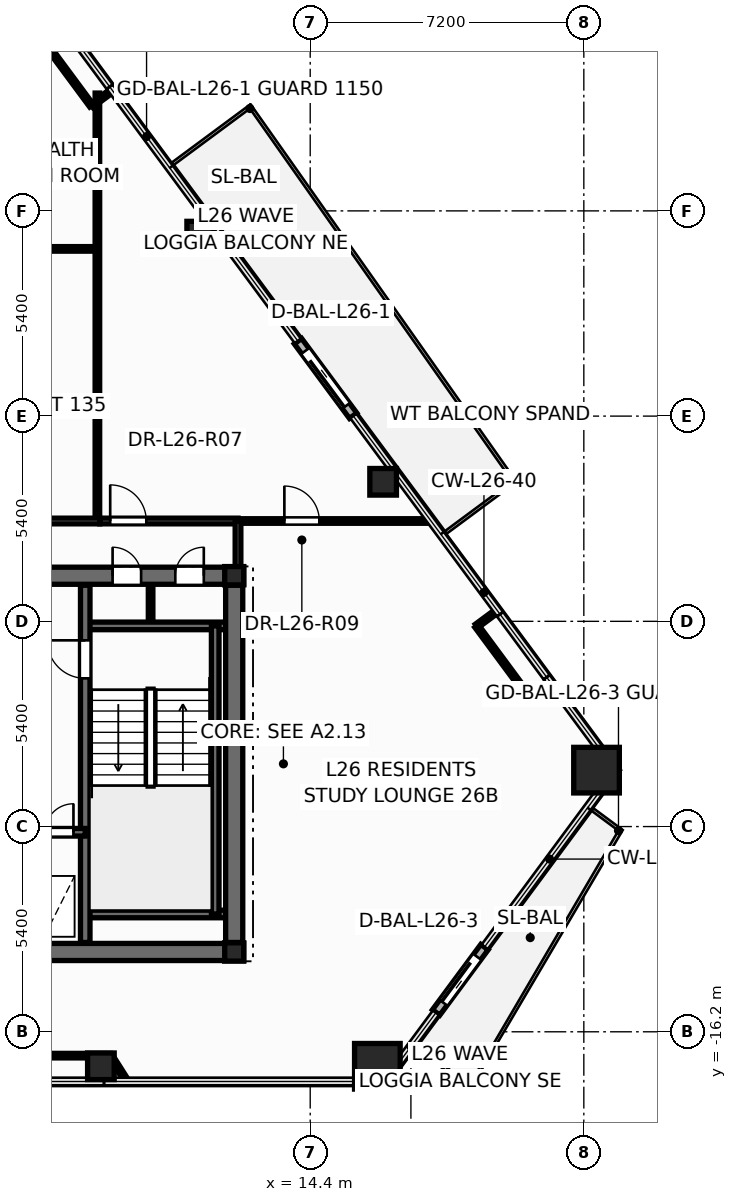
"""IFC4 building model, lengths in metres.
Left out: names, types, materials, properties, quantities, classifications, styles, units other than length and angle.
Written with IfcOpenShell. Run it as: python <this file> out.ifc"""

import sys

from ifc_helpers import new_model, si_unit, direction, frame, frame_2d, origin, origin_2d, place, context, subcontext, project, spatial, rectangle, hollow_rectangle, hollow_circle, i_section, extrude, element, fill, save


model = new_model("IFC4")
c1 = context("Model", 3, precision=1e-05, world=origin(), true_north=direction((0.0, 1.0)))
c2 = subcontext(c1, "Body", "Model", "MODEL_VIEW")
j1 = project(units=[si_unit("LENGTHUNIT", "METRE"), si_unit("PLANEANGLEUNIT", "RADIAN")], contexts=[c1])
p1 = place(None, origin())
s1 = spatial("IfcSite", under=j1, at=p1, CompositionType="ELEMENT")
p2 = place(p1, origin())
s2 = spatial("IfcBuilding", under=s1, at=p2, CompositionType="ELEMENT")
p3 = place(p2, frame((0.0, 0.0, 103.2)))
s3 = spatial("IfcBuildingStorey", under=s2, at=p3, CompositionType="ELEMENT", Elevation=103.2)
for number, where, z_axis, x_axis in (
    (1, (16.167, -17.108, 0.0), (0.0, 0.0, 1.0), (1.0, 0.0, 0.0)),
    (2, (21.934, -9.316, 0.0), (0.0, 0.0, 1.0), (1.0, 0.0, 0.0)),
):
    element("IfcColumn", number, at=place(p3, frame(where, z_axis=z_axis, x_axis=x_axis)), inside=s3, PredefinedType="COLUMN", context=c2, shape_type="SweptSolid", body=[
        extrude(hollow_rectangle(XDim=1.2, YDim=1.2, WallThickness=0.055, at=origin_2d()), origin(), (0.0, 0.0, 1.0), 3.6),
    ])
for number, where, z_axis, x_axis in (
    (3, (8.892, -17.108, 0.0), (0.0, 0.0, 1.0), (1.0, 0.0, 0.0)),
    (4, (16.319, -1.729, 0.0), (0.0, 0.0, 1.0), (1.0, 0.0, 0.0)),
    (5, (11.506, 4.775, 0.0), (0.0, 0.0, 1.0), (1.0, 0.0, 0.0)),
):
    element("IfcColumn", number, at=place(p3, frame(where, z_axis=z_axis, x_axis=x_axis)), inside=s3, PredefinedType="COLUMN", context=c2, shape_type="SweptSolid", body=[
        extrude(hollow_circle(Radius=0.35, WallThickness=0.03, at=origin_2d()), origin(), (0.0, 0.0, 1.0), 3.6),
    ])
for number, where, z_axis, x_axis in (
    (6, (12.4, -14.1, 0.0), (0.0, 0.0, 1.0), (1.0, 0.0, 0.0)),
    (7, (12.4, -4.2, 0.0), (0.0, 0.0, 1.0), (1.0, 0.0, 0.0)),
):
    element("IfcColumn", number, at=place(p3, frame(where, z_axis=z_axis, x_axis=x_axis)), inside=s3, PredefinedType="COLUMN", context=c2, shape_type="SweptSolid", body=[
        extrude(i_section(OverallWidth=0.5, OverallDepth=0.482, WebThickness=0.04, FlangeThickness=0.045, at=origin_2d()), origin(), (0.0, 0.0, 1.0), 3.6),
    ])
p4 = place(p3, frame((15.53, 0.01, -0.015), z_axis=(0.0, 0.0, 1.0), x_axis=(-0.594897308784, 0.803801711868, 0.0)))
e8 = element("IfcWall", 8, at=p4, inside=s3, PredefinedType="STANDARD", context=c2, shape_type="SweptSolid", body=[
    extrude(rectangle(XDim=2.44, YDim=0.24, at=frame_2d((1.22, 0.0))), origin(), (0.0, 0.0, 1.0), 2.728),
])
p5 = place(p4, frame((0.32, 0.0, 0.015)))
e9 = element("IfcOpeningElement", 9, at=p5, cuts=e8, PredefinedType="OPENING", context=c2, shape_type="SweptSolid", body=[
    extrude(rectangle(XDim=1.806, YDim=2.204, at=frame_2d((0.9, 1.102))), frame((0.0, 0.13, 0.0), z_axis=(0.0, -1.0, 0.0), x_axis=(1.0, 0.0, 0.0)), (0.0, 0.0, 1.0), 0.26),
])
p6 = place(p3, frame((17.713, -15.691, -0.015), z_axis=(0.0, 0.0, 1.0), x_axis=(0.59491376708, 0.803789530747, 0.0)))
e10 = element("IfcWall", 10, at=p6, inside=s3, PredefinedType="STANDARD", context=c2, shape_type="SweptSolid", body=[
    extrude(rectangle(XDim=2.14, YDim=0.24, at=frame_2d((1.07, 0.0))), origin(), (0.0, 0.0, 1.0), 2.728),
])
p7 = place(p6, frame((0.32, 0.0, 0.015)))
e11 = element("IfcOpeningElement", 11, at=p7, cuts=e10, PredefinedType="OPENING", context=c2, shape_type="SweptSolid", body=[
    extrude(rectangle(XDim=1.506, YDim=2.204, at=frame_2d((0.75, 1.102))), frame((0.0, 0.13, 0.0), z_axis=(0.0, -1.0, 0.0), x_axis=(1.0, 0.0, 0.0)), (0.0, 0.0, 1.0), 0.26),
])
p8 = place(p3, frame((10.2, -5.52, 0.0), z_axis=(0.0, 0.0, 1.0), x_axis=(0.0, 1.0, 0.0)))
e12 = element("IfcWall", 12, at=p8, inside=s3, PredefinedType="PARTITIONING", context=c2, shape_type="SweptSolid", body=[
    extrude(rectangle(XDim=1.12, YDim=0.12, at=frame_2d((0.56, 0.0))), origin(), (0.0, 0.0, 1.0), 3.35),
])
p9 = place(p3, frame((-12.65, -14.1, 0.0), z_axis=(0.0, 0.0, 1.0), x_axis=(1.0, 0.0, 0.0)))
e13 = element("IfcWall", 13, at=p9, inside=s3, PredefinedType="SHEAR", context=c2, shape_type="SweptSolid", body=[
    extrude(rectangle(XDim=25.3, YDim=0.45, at=frame_2d((12.65, 0.0))), origin(), (0.0, 0.0, 1.0), 3.6),
])
p10 = place(p3, frame((-12.65, -4.2, 0.0), z_axis=(0.0, 0.0, 1.0), x_axis=(1.0, 0.0, 0.0)))
e14 = element("IfcWall", 14, at=p10, inside=s3, PredefinedType="SHEAR", context=c2, shape_type="SweptSolid", body=[
    extrude(rectangle(XDim=25.3, YDim=0.45, at=frame_2d((12.65, 0.0))), origin(), (0.0, 0.0, 1.0), 3.6),
])
p11 = place(p10, frame((0.95, 0.0, 0.0)))
e15 = element("IfcOpeningElement", 15, at=p11, cuts=e14, PredefinedType="OPENING", context=c2, shape_type="SweptSolid", body=[
    extrude(rectangle(XDim=0.756, YDim=2.054, at=frame_2d((0.375, 1.027))), frame((0.0, 0.235, 0.0), z_axis=(0.0, -1.0, 0.0), x_axis=(1.0, 0.0, 0.0)), (0.0, 0.0, 1.0), 0.47),
])
p12 = place(p10, frame((2.6, 0.0, 0.0)))
e16 = element("IfcOpeningElement", 16, at=p12, cuts=e14, PredefinedType="OPENING", context=c2, shape_type="SweptSolid", body=[
    extrude(rectangle(XDim=0.756, YDim=2.054, at=frame_2d((0.375, 1.027))), frame((0.0, 0.235, 0.0), z_axis=(0.0, -1.0, 0.0), x_axis=(1.0, 0.0, 0.0)), (0.0, 0.0, 1.0), 0.47),
])
p13 = place(p10, frame((21.85, 0.0, 0.0)))
e17 = element("IfcOpeningElement", 17, at=p13, cuts=e14, PredefinedType="OPENING", context=c2, shape_type="SweptSolid", body=[
    extrude(rectangle(XDim=0.756, YDim=2.054, at=frame_2d((0.375, 1.027))), frame((0.0, 0.235, 0.0), z_axis=(0.0, -1.0, 0.0), x_axis=(1.0, 0.0, 0.0)), (0.0, 0.0, 1.0), 0.47),
])
p14 = place(p10, frame((23.5, 0.0, 0.0)))
e18 = element("IfcOpeningElement", 18, at=p14, cuts=e14, PredefinedType="OPENING", context=c2, shape_type="SweptSolid", body=[
    extrude(rectangle(XDim=0.756, YDim=2.054, at=frame_2d((0.375, 1.027))), frame((0.0, 0.235, 0.0), z_axis=(0.0, -1.0, 0.0), x_axis=(1.0, 0.0, 0.0)), (0.0, 0.0, 1.0), 0.47),
])
p15 = place(p10, frame((5.85, 0.0, 0.0)))
e19 = element("IfcOpeningElement", 19, at=p15, cuts=e14, PredefinedType="OPENING", context=c2, shape_type="SweptSolid", body=[
    extrude(rectangle(XDim=1.006, YDim=2.104, at=frame_2d((0.5, 1.052))), frame((0.0, 0.235, 0.0), z_axis=(0.0, -1.0, 0.0), x_axis=(1.0, 0.0, 0.0)), (0.0, 0.0, 1.0), 0.47),
])
p16 = place(p10, frame((10.35, 0.0, 0.0)))
e20 = element("IfcOpeningElement", 20, at=p16, cuts=e14, PredefinedType="OPENING", context=c2, shape_type="SweptSolid", body=[
    extrude(rectangle(XDim=1.406, YDim=2.154, at=frame_2d((0.7, 1.077))), frame((0.0, 0.235, 0.0), z_axis=(0.0, -1.0, 0.0), x_axis=(1.0, 0.0, 0.0)), (0.0, 0.0, 1.0), 0.47),
])
p17 = place(p10, frame((18.45, 0.0, 0.0)))
e21 = element("IfcOpeningElement", 21, at=p17, cuts=e14, PredefinedType="OPENING", context=c2, shape_type="SweptSolid", body=[
    extrude(rectangle(XDim=1.006, YDim=2.104, at=frame_2d((0.5, 1.052))), frame((0.0, 0.235, 0.0), z_axis=(0.0, -1.0, 0.0), x_axis=(1.0, 0.0, 0.0)), (0.0, 0.0, 1.0), 0.47),
])
for number, where, z_axis, x_axis in (
    (22, (8.48, -5.52, 0.0), (0.0, 0.0, 1.0), (1.0, 0.0, 0.0)),
    (23, (8.48, -13.1, 0.0), (0.0, 0.0, 1.0), (1.0, 0.0, 0.0)),
):
    element("IfcWall", number, at=place(p3, frame(where, z_axis=z_axis, x_axis=x_axis)), inside=s3, PredefinedType="SOLIDWALL", context=c2, shape_type="SweptSolid", body=[
        extrude(rectangle(XDim=3.87, YDim=0.2, at=frame_2d((1.935, 0.0))), origin(), (0.0, 0.0, 1.0), 3.6),
    ])
p18 = place(p3, frame((11.9, -13.1, 0.0), z_axis=(0.0, 0.0, 1.0), x_axis=(0.0, 1.0, 0.0)))
e24 = element("IfcWall", 24, at=p18, inside=s3, PredefinedType="SOLIDWALL", context=c2, shape_type="SweptSolid", body=[
    extrude(rectangle(XDim=7.58, YDim=0.2, at=frame_2d((3.79, 0.0))), origin(), (0.0, 0.0, 1.0), 3.6),
])
p19 = place(p3, frame((8.48, -13.85, 0.0), z_axis=(0.0, 0.0, 1.0), x_axis=(0.0, 1.0, 0.0)))
e25 = element("IfcWall", 25, at=p19, inside=s3, PredefinedType="SHEAR", context=c2, shape_type="SweptSolid", body=[
    extrude(rectangle(XDim=9.4, YDim=0.25, at=frame_2d((4.7, 0.0))), origin(), (0.0, 0.0, 1.0), 3.6),
])
p20 = place(p19, frame((6.95, 0.0, 0.0)))
e26 = element("IfcOpeningElement", 26, at=p20, cuts=e25, PredefinedType="OPENING", context=c2, shape_type="SweptSolid", body=[
    extrude(rectangle(XDim=1.006, YDim=2.104, at=frame_2d((0.5, 1.052))), frame((0.0, 0.135, 0.0), z_axis=(0.0, -1.0, 0.0), x_axis=(1.0, 0.0, 0.0)), (0.0, 0.0, 1.0), 0.27),
])
p21 = place(p3, frame((5.12, -10.95, 0.0), z_axis=(0.0, 0.0, 1.0), x_axis=(1.0, 0.0, 0.0)))
e27 = element("IfcWall", 27, at=p21, inside=s3, PredefinedType="SOLIDWALL", context=c2, shape_type="SweptSolid", body=[
    extrude(rectangle(XDim=3.36, YDim=0.2, at=frame_2d((1.68, 0.0))), origin(), (0.0, 0.0, 1.0), 3.6),
])
p22 = place(p21, frame((0.42, 0.0, 0.0)))
e28 = element("IfcOpeningElement", 28, at=p22, cuts=e27, PredefinedType="OPENING", context=c2, shape_type="SweptSolid", body=[
    extrude(rectangle(XDim=1.106, YDim=2.104, at=frame_2d((0.55, 1.052))), frame((0.0, 0.11, 0.0), z_axis=(0.0, -1.0, 0.0), x_axis=(1.0, 0.0, 0.0)), (0.0, 0.0, 1.0), 0.22),
])
p23 = place(p21, frame((2.3, 0.0, 0.0)))
e29 = element("IfcOpeningElement", 29, at=p23, cuts=e27, PredefinedType="OPENING", context=c2, shape_type="SweptSolid", body=[
    extrude(rectangle(XDim=0.756, YDim=2.054, at=frame_2d((0.375, 1.027))), frame((0.0, 0.11, 0.0), z_axis=(0.0, -1.0, 0.0), x_axis=(1.0, 0.0, 0.0)), (0.0, 0.0, 1.0), 0.22),
])
p24 = place(p3, frame((12.4, -13.85, 0.0), z_axis=(0.0, 0.0, 1.0), x_axis=(0.0, 1.0, 0.0)))
e30 = element("IfcWall", 30, at=p24, inside=s3, PredefinedType="SHEAR", context=c2, shape_type="SweptSolid", body=[
    extrude(rectangle(XDim=9.4, YDim=0.45, at=frame_2d((4.7, 0.0))), origin(), (0.0, 0.0, 1.0), 3.6),
])
p25 = place(p3, frame((8.8, -2.76, 0.0), z_axis=(0.0, 0.0, 1.0), x_axis=(0.0, 1.0, 0.0)))
e31 = element("IfcWall", 31, at=p25, inside=s3, PredefinedType="PARTITIONING", context=c2, shape_type="SweptSolid", body=[
    extrude(rectangle(XDim=11.26, YDim=0.12, at=frame_2d((5.63, 0.0))), origin(), (0.0, 0.0, 1.0), 2.617),
])
p26 = place(p3, frame((2.36, 4.4, 0.0), z_axis=(0.0, 0.0, 1.0), x_axis=(1.0, 0.0, 0.0)))
e32 = element("IfcWall", 32, at=p26, inside=s3, PredefinedType="PARTITIONING", context=c2, shape_type="SweptSolid", body=[
    extrude(rectangle(XDim=6.44, YDim=0.12, at=frame_2d((3.22, 0.0))), origin(), (0.0, 0.0, 1.0), 2.617),
])
p27 = place(p3, frame((12.44, -2.76, 0.0), z_axis=(0.0, 0.0, 1.0), x_axis=(1.0, 0.0, 0.0)))
e33 = element("IfcWall", 33, at=p27, inside=s3, PredefinedType="PARTITIONING", context=c2, shape_type="SweptSolid", body=[
    extrude(rectangle(XDim=5.14, YDim=0.12, at=frame_2d((2.57, 0.0))), origin(), (0.0, 0.0, 1.0), 2.713),
])
p28 = place(p27, frame((1.28, 0.0, 0.0)))
e34 = element("IfcOpeningElement", 34, at=p28, cuts=e33, PredefinedType="OPENING", context=c2, shape_type="SweptSolid", body=[
    extrude(rectangle(XDim=0.926, YDim=2.104, at=frame_2d((0.46, 1.052))), frame((0.0, 0.07, 0.0), z_axis=(0.0, -1.0, 0.0), x_axis=(1.0, 0.0, 0.0)), (0.0, 0.0, 1.0), 0.14),
])
p29 = place(p3, frame((5.1, -2.76, 0.0), z_axis=(0.0, 0.0, 1.0), x_axis=(1.0, 0.0, 0.0)))
e35 = element("IfcWall", 35, at=p29, inside=s3, PredefinedType="PARTITIONING", context=c2, shape_type="SweptSolid", body=[
    extrude(rectangle(XDim=3.76, YDim=0.15, at=frame_2d((1.88, 0.0))), origin(), (0.0, 0.0, 1.0), 2.325),
])
p30 = place(p3, frame((8.862, -2.76, 0.0), z_axis=(0.0, 0.0, 1.0), x_axis=(1.0, 0.0, 0.0)))
e36 = element("IfcWall", 36, at=p30, inside=s3, PredefinedType="PARTITIONING", context=c2, shape_type="SweptSolid", body=[
    extrude(rectangle(XDim=3.638, YDim=0.15, at=frame_2d((1.819, 0.0))), origin(), (0.0, 0.0, 1.0), 3.35),
])
p31 = place(p30, frame((0.275, 0.0, 0.0)))
e37 = element("IfcOpeningElement", 37, at=p31, cuts=e36, PredefinedType="OPENING", context=c2, shape_type="SweptSolid", body=[
    extrude(rectangle(XDim=0.956, YDim=2.104, at=frame_2d((0.475, 1.052))), frame((0.0, 0.085, 0.0), z_axis=(0.0, -1.0, 0.0), x_axis=(1.0, 0.0, 0.0)), (0.0, 0.0, 1.0), 0.17),
])
p32 = place(p3, frame((5.573, -16.828, 0.0), z_axis=(0.0, 0.0, 1.0), x_axis=(1.0, 0.0, 0.0)))
e38 = element("IfcWall", 38, at=p32, inside=s3, PredefinedType="PARTITIONING", context=c2, shape_type="SweptSolid", body=[
    extrude(rectangle(XDim=3.569, YDim=0.12, at=frame_2d((1.784, 0.0))), origin(), (0.0, 0.0, 1.0), 2.713),
])
p33 = place(p3, frame((8.646, 8.169, 0.0), z_axis=(0.0, 0.0, 1.0), x_axis=(-0.594914508596, 0.803788981924, 0.0)))
e39 = element("IfcWall", 39, at=p33, inside=s3, PredefinedType="PARTITIONING", context=c2, shape_type="SweptSolid", body=[
    extrude(rectangle(XDim=2.294, YDim=0.12, at=frame_2d((1.147, 0.0))), origin(), (0.0, 0.0, 1.0), 3.35),
])
p34 = place(p3, frame((20.144, -7.368, 0.0), z_axis=(0.0, 0.0, 1.0), x_axis=(-0.594863630048, 0.803826636561, 0.0)))
e40 = element("IfcWall", 40, at=p34, inside=s3, PredefinedType="PARTITIONING", context=c2, shape_type="SweptSolid", body=[
    extrude(rectangle(XDim=2.295, YDim=0.12, at=frame_2d((1.147, 0.0))), origin(), (0.0, 0.0, 1.0), 3.35),
])
p35 = place(p3, frame((12.5, -4.24, 0.0), z_axis=(0.0, 0.0, 1.0), x_axis=(0.0, 1.0, 0.0)))
e41 = element("IfcWall", 41, at=p35, inside=s3, PredefinedType="PARTITIONING", context=c2, shape_type="SweptSolid", body=[
    extrude(rectangle(XDim=1.48, YDim=0.15, at=frame_2d((0.74, 0.0))), origin(), (0.0, 0.0, 1.0), 2.325),
])
p36 = place(p3, frame((21.017, -7.42, 0.0), z_axis=(0.0, 0.0, 1.0), x_axis=(-0.998195482696, 0.060048133402, 0.0)))
e42 = element("IfcWall", 42, at=p36, inside=s3, PredefinedType="PARTITIONING", context=c2, shape_type="SweptSolid", body=[
    extrude(rectangle(XDim=0.874, YDim=0.12, at=frame_2d((0.437, 0.0))), origin(), (0.0, 0.0, 1.0), 2.713),
])
p37 = place(p3, frame((9.141, -16.828, 0.0), z_axis=(0.0, 0.0, 1.0), x_axis=(0.535959408162, -0.844243752007, 0.0)))
e43 = element("IfcWall", 43, at=p37, inside=s3, PredefinedType="PARTITIONING", context=c2, shape_type="SweptSolid", body=[
    extrude(rectangle(XDim=0.793, YDim=0.12, at=frame_2d((0.397, 0.0))), origin(), (0.0, 0.0, 1.0), 2.713),
])
p38 = place(p3, frame((18.779, -5.524, 0.0), z_axis=(0.0, 0.0, 1.0), x_axis=(0.803744328022, 0.594974835748, 0.0)))
e44 = element("IfcWall", 44, at=p38, inside=s3, PredefinedType="PARTITIONING", context=c2, shape_type="SweptSolid", body=[
    extrude(rectangle(XDim=0.67, YDim=0.12, at=frame_2d((0.335, 0.0))), origin(), (0.0, 0.0, 1.0), 2.713),
])
p39 = place(p3, frame((9.184, 8.567, 0.0), z_axis=(0.0, 0.0, 1.0), x_axis=(-0.803615295139, -0.595149105198, 0.0)))
e45 = element("IfcWall", 45, at=p39, inside=s3, PredefinedType="PARTITIONING", context=c2, shape_type="SweptSolid", body=[
    extrude(rectangle(XDim=0.67, YDim=0.12, at=frame_2d((0.335, 0.0))), origin(), (0.0, 0.0, 1.0), 2.713),
])
p40 = place(p5, origin())
e46 = element("IfcDoor", 46, at=p40, inside=s3, OperationType="SLIDING_TO_LEFT", PredefinedType="DOOR", context=c2, shape_type="SweptSolid", body=[
    extrude(rectangle(XDim=1.8, YDim=2.2, at=frame_2d((0.9, 1.1))), frame((0.0, 0.025, 0.0), z_axis=(0.0, -1.0, 0.0), x_axis=(1.0, 0.0, 0.0)), (0.0, 0.0, 1.0), 0.05),
])
fill(e9, e46)
p41 = place(p7, origin())
e47 = element("IfcDoor", 47, at=p41, inside=s3, OperationType="SLIDING_TO_RIGHT", PredefinedType="DOOR", context=c2, shape_type="SweptSolid", body=[
    extrude(rectangle(XDim=1.5, YDim=2.2, at=frame_2d((0.75, 1.1))), frame((0.0, 0.025, 0.0), z_axis=(0.0, -1.0, 0.0), x_axis=(1.0, 0.0, 0.0)), (0.0, 0.0, 1.0), 0.05),
])
fill(e11, e47)
p42 = place(p20, origin())
e48 = element("IfcDoor", 48, at=p42, inside=s3, OperationType="SINGLE_SWING_RIGHT", PredefinedType="DOOR", context=c2, shape_type="SweptSolid", body=[
    extrude(rectangle(XDim=1.0, YDim=2.1, at=frame_2d((0.5, 1.05))), frame((0.0, 0.025, 0.0), z_axis=(0.0, -1.0, 0.0), x_axis=(1.0, 0.0, 0.0)), (0.0, 0.0, 1.0), 0.05),
])
fill(e26, e48)
p43 = place(p23, origin())
e49 = element("IfcDoor", 49, at=p43, inside=s3, OperationType="SINGLE_SWING_RIGHT", PredefinedType="DOOR", context=c2, shape_type="SweptSolid", body=[
    extrude(rectangle(XDim=0.75, YDim=2.05, at=frame_2d((0.375, 1.025))), frame((0.0, 0.025, 0.0), z_axis=(0.0, -1.0, 0.0), x_axis=(1.0, 0.0, 0.0)), (0.0, 0.0, 1.0), 0.05),
])
fill(e29, e49)
p44 = place(p13, origin())
e50 = element("IfcDoor", 50, at=p44, inside=s3, OperationType="SINGLE_SWING_LEFT", PredefinedType="DOOR", context=c2, shape_type="SweptSolid", body=[
    extrude(rectangle(XDim=0.75, YDim=2.05, at=frame_2d((0.375, 1.025))), frame((0.0, 0.025, 0.0), z_axis=(0.0, -1.0, 0.0), x_axis=(1.0, 0.0, 0.0)), (0.0, 0.0, 1.0), 0.05),
])
fill(e17, e50)
p45 = place(p14, origin())
e51 = element("IfcDoor", 51, at=p45, inside=s3, OperationType="SINGLE_SWING_RIGHT", PredefinedType="DOOR", context=c2, shape_type="SweptSolid", body=[
    extrude(rectangle(XDim=0.75, YDim=2.05, at=frame_2d((0.375, 1.025))), frame((0.0, 0.025, 0.0), z_axis=(0.0, -1.0, 0.0), x_axis=(1.0, 0.0, 0.0)), (0.0, 0.0, 1.0), 0.05),
])
fill(e18, e51)
p46 = place(p31, origin())
e52 = element("IfcDoor", 52, at=p46, inside=s3, OperationType="SINGLE_SWING_LEFT", PredefinedType="DOOR", context=c2, shape_type="SweptSolid", body=[
    extrude(rectangle(XDim=0.95, YDim=2.1, at=frame_2d((0.475, 1.05))), frame((0.0, 0.025, 0.0), z_axis=(0.0, -1.0, 0.0), x_axis=(1.0, 0.0, 0.0)), (0.0, 0.0, 1.0), 0.05),
])
fill(e37, e52)
p47 = place(p28, origin())
e53 = element("IfcDoor", 53, at=p47, inside=s3, OperationType="SINGLE_SWING_LEFT", PredefinedType="DOOR", context=c2, shape_type="SweptSolid", body=[
    extrude(rectangle(XDim=0.92, YDim=2.1, at=frame_2d((0.46, 1.05))), frame((0.0, 0.025, 0.0), z_axis=(0.0, -1.0, 0.0), x_axis=(1.0, 0.0, 0.0)), (0.0, 0.0, 1.0), 0.05),
])
fill(e34, e53)
save(model, sys.argv[1])
